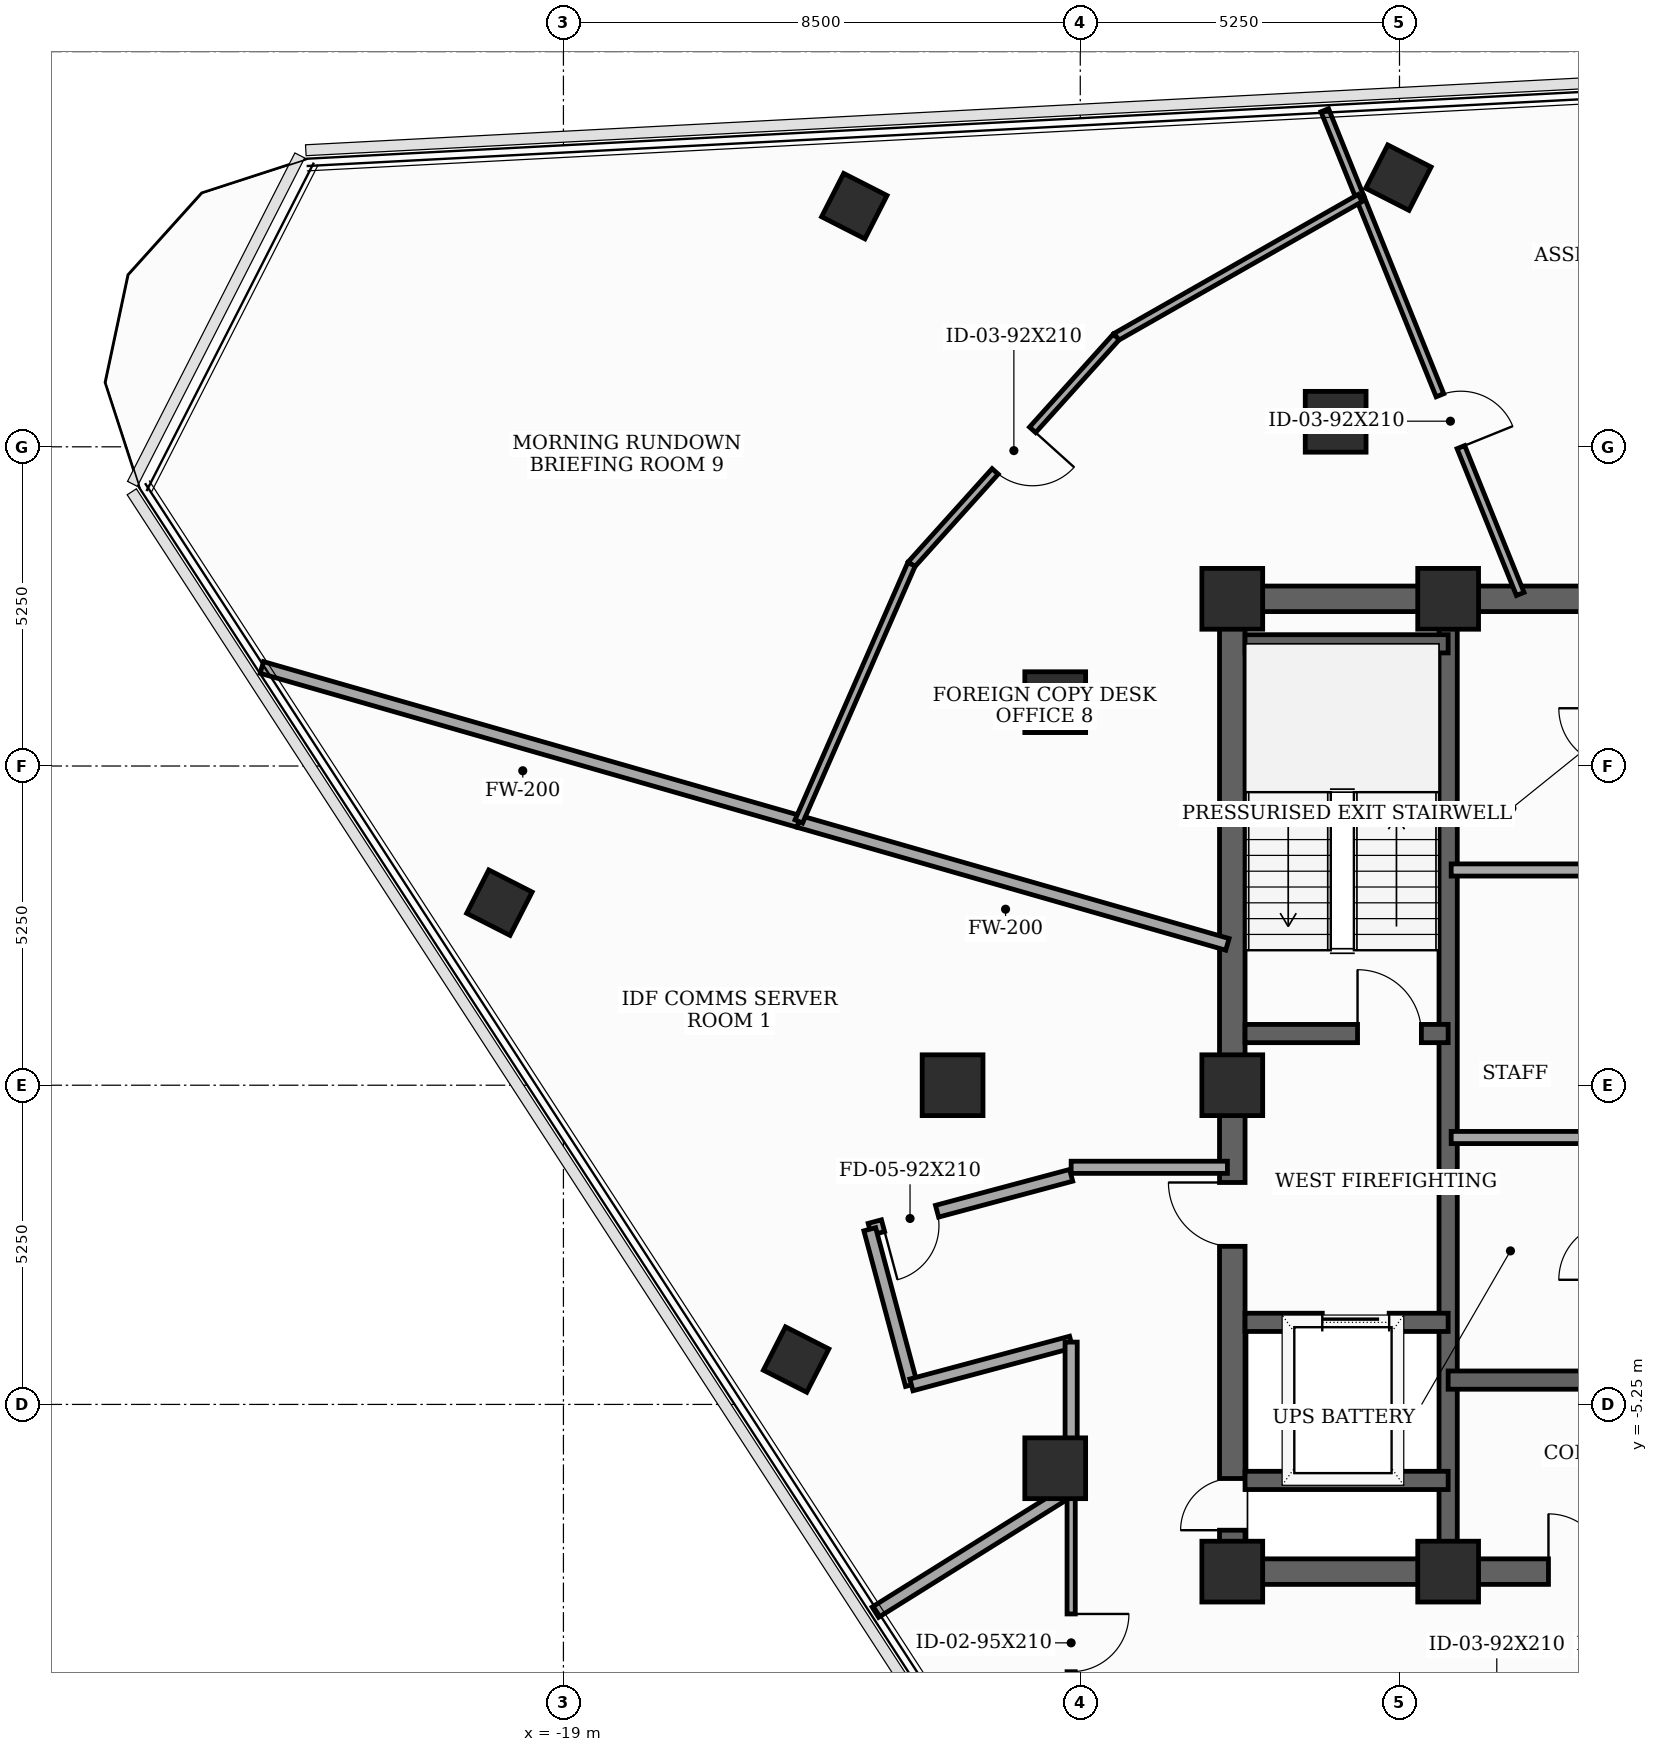
"""IFC4 building model, lengths in metres.
Left out: names, types, materials, properties, quantities, classifications, styles, units other than length and angle.
Written with IfcOpenShell. Run it as: python <this file> out.ifc"""

import sys

from ifc_helpers import new_model, si_unit, direction, frame, frame_2d, origin, origin_2d, place, context, subcontext, project, spatial, rectangle, extrude, element, fill, save


model = new_model("IFC4")
c1 = context("Model", 3, precision=1e-05, world=origin(), true_north=direction((0.0, 1.0)))
c2 = subcontext(c1, "Body", "Model", "MODEL_VIEW")
j1 = project(units=[si_unit("LENGTHUNIT", "METRE"), si_unit("PLANEANGLEUNIT", "RADIAN")], contexts=[c1])
p1 = place(None, origin())
s1 = spatial("IfcSite", under=j1, at=p1, CompositionType="ELEMENT")
p2 = place(p1, origin())
s2 = spatial("IfcBuilding", under=s1, at=p2, CompositionType="ELEMENT")
p3 = place(p2, frame((0.0, 0.0, 259.6)))
s3 = spatial("IfcBuildingStorey", under=s2, at=p3, CompositionType="ELEMENT", Elevation=259.6)
for number, where, z_axis, x_axis in (
    (1, (-8.0, -8.0, 0.0), (0.0, 0.0, 1.0), (1.0, 0.0, 0.0)),
    (2, (-4.45, -8.0, 0.0), (0.0, 0.0, 1.0), (1.0, 0.0, 0.0)),
    (3, (-4.45, 8.0, 0.0), (0.0, 0.0, 1.0), (1.0, 0.0, 0.0)),
    (4, (-8.0, 8.0, 0.0), (0.0, 0.0, 1.0), (1.0, 0.0, 0.0)),
    (5, (-8.0, 0.0, 0.0), (0.0, 0.0, 1.0), (1.0, 0.0, 0.0)),
    (6, (-6.3, 10.912, 0.0), (0.0, 0.0, 1.0), (1.0, 0.0, 0.0)),
    (7, (-10.912, 6.3, 0.0), (0.0, 0.0, 1.0), (1.0, 0.0, 0.0)),
    (8, (-12.6, 0.0, 0.0), (0.0, 0.0, 1.0), (1.0, 0.0, 0.0)),
    (9, (-10.912, -6.3, 0.0), (0.0, 0.0, 1.0), (1.0, 0.0, 0.0)),
):
    element("IfcColumn", number, at=place(p3, frame(where, z_axis=z_axis, x_axis=x_axis)), inside=s3, PredefinedType="COLUMN", context=c2, shape_type="SweptSolid", body=[
        extrude(rectangle(XDim=1.0, YDim=1.0, at=origin_2d()), origin(), (0.0, 0.0, 1.0), 3.7),
    ])
for number, where, z_axis, x_axis in (
    (10, (-5.269, 14.927, 0.0), (0.0, 0.0, 1.0), (0.454, 0.891, 0.0)),
    (11, (-14.216, 14.458, 0.0), (0.0, 0.0, 1.0), (0.454, 0.891, 0.0)),
    (12, (-20.053, 3.003, 0.0), (0.0, 0.0, 1.0), (0.454, 0.891, 0.0)),
    (13, (-15.173, -4.512, 0.0), (0.0, 0.0, 1.0), (0.454, 0.891, 0.0)),
):
    element("IfcColumn", number, at=place(p3, frame(where, z_axis=z_axis, x_axis=x_axis)), inside=s3, PredefinedType="COLUMN", context=c2, shape_type="SweptSolid", body=[
        extrude(rectangle(XDim=0.8, YDim=0.8, at=origin_2d()), origin(), (0.0, 0.0, 1.0), 3.7),
    ])
p4 = place(p3, frame((-8.0, -8.0, 0.0), z_axis=(0.0, 0.0, 1.0), x_axis=(0.0, 1.0, 0.0)))
e14 = element("IfcWall", 14, at=p4, inside=s3, PredefinedType="SHEAR", context=c2, shape_type="SweptSolid", body=[
    extrude(rectangle(XDim=16.0, YDim=0.42, at=frame_2d((8.0, 0.0))), origin(), (0.0, 0.0, 1.0), 3.5),
])
p5 = place(p4, frame((0.681, 0.0, 0.0)))
e15 = element("IfcOpeningElement", 15, at=p5, cuts=e14, PredefinedType="OPENING", context=c2, shape_type="SweptSolid", body=[
    extrude(rectangle(XDim=0.85, YDim=2.02, at=frame_2d((0.425, 1.01))), frame((0.0, 0.22, 0.0), z_axis=(0.0, -1.0, 0.0), x_axis=(1.0, 0.0, 0.0)), (0.0, 0.0, 1.0), 0.44),
])
p6 = place(p4, frame((5.35, 0.0, 0.0)))
e16 = element("IfcOpeningElement", 16, at=p6, cuts=e14, PredefinedType="OPENING", context=c2, shape_type="SweptSolid", body=[
    extrude(rectangle(XDim=1.05, YDim=2.15, at=frame_2d((0.525, 1.075))), frame((0.0, 0.22, 0.0), z_axis=(0.0, -1.0, 0.0), x_axis=(1.0, 0.0, 0.0)), (0.0, 0.0, 1.0), 0.44),
])
p7 = place(p3, frame((-8.0, -8.0, 0.0), z_axis=(0.0, 0.0, 1.0), x_axis=(1.0, 0.0, 0.0)))
e17 = element("IfcWall", 17, at=p7, inside=s3, PredefinedType="SHEAR", context=c2, shape_type="SweptSolid", body=[
    extrude(rectangle(XDim=16.0, YDim=0.42, at=frame_2d((8.0, 0.0))), origin(), (0.0, 0.0, 1.0), 3.5),
])
p8 = place(p7, frame((5.2, 0.0, 0.0)))
e18 = element("IfcOpeningElement", 18, at=p8, cuts=e17, PredefinedType="OPENING", context=c2, shape_type="SweptSolid", body=[
    extrude(rectangle(XDim=0.95, YDim=2.1, at=frame_2d((0.475, 1.05))), frame((0.0, 0.22, 0.0), z_axis=(0.0, -1.0, 0.0), x_axis=(1.0, 0.0, 0.0)), (0.0, 0.0, 1.0), 0.44),
])
p9 = place(p7, frame((9.8, 0.0, 0.0)))
e19 = element("IfcOpeningElement", 19, at=p9, cuts=e17, PredefinedType="OPENING", context=c2, shape_type="SweptSolid", body=[
    extrude(rectangle(XDim=0.95, YDim=2.1, at=frame_2d((0.475, 1.05))), frame((0.0, 0.22, 0.0), z_axis=(0.0, -1.0, 0.0), x_axis=(1.0, 0.0, 0.0)), (0.0, 0.0, 1.0), 0.44),
])
p10 = place(p3, frame((-8.0, 8.0, 0.0), z_axis=(0.0, 0.0, 1.0), x_axis=(1.0, 0.0, 0.0)))
e20 = element("IfcWall", 20, at=p10, inside=s3, PredefinedType="SHEAR", context=c2, shape_type="SweptSolid", body=[
    extrude(rectangle(XDim=16.0, YDim=0.42, at=frame_2d((8.0, 0.0))), origin(), (0.0, 0.0, 1.0), 3.5),
])
p11 = place(p10, frame((7.1, 0.0, 0.0)))
e21 = element("IfcOpeningElement", 21, at=p11, cuts=e20, PredefinedType="OPENING", context=c2, shape_type="SweptSolid", body=[
    extrude(rectangle(XDim=1.8, YDim=2.15, at=frame_2d((0.9, 1.075))), frame((0.0, 0.22, 0.0), z_axis=(0.0, -1.0, 0.0), x_axis=(1.0, 0.0, 0.0)), (0.0, 0.0, 1.0), 0.44),
])
p12 = place(p3, frame((-4.45, -7.79, 0.0), z_axis=(0.0, 0.0, 1.0), x_axis=(0.0, 1.0, 0.0)))
e22 = element("IfcWall", 22, at=p12, inside=s3, PredefinedType="SHEAR", context=c2, shape_type="SweptSolid", body=[
    extrude(rectangle(XDim=15.58, YDim=0.3, at=frame_2d((7.79, 0.0))), origin(), (0.0, 0.0, 1.0), 3.5),
])
p13 = place(p3, frame((-7.79, 0.85, 0.0), z_axis=(0.0, 0.0, 1.0), x_axis=(1.0, 0.0, 0.0)))
e23 = element("IfcWall", 23, at=p13, inside=s3, PredefinedType="SHEAR", context=c2, shape_type="SweptSolid", body=[
    extrude(rectangle(XDim=3.34, YDim=0.3, at=frame_2d((1.67, 0.0))), origin(), (0.0, 0.0, 1.0), 3.5),
])
p14 = place(p13, frame((1.85, 0.0, 0.0)))
e24 = element("IfcOpeningElement", 24, at=p14, cuts=e23, PredefinedType="OPENING", context=c2, shape_type="SweptSolid", body=[
    extrude(rectangle(XDim=1.05, YDim=2.15, at=frame_2d((0.525, 1.075))), frame((0.0, 0.16, 0.0), z_axis=(0.0, -1.0, 0.0), x_axis=(1.0, 0.0, 0.0)), (0.0, 0.0, 1.0), 0.32),
])
p15 = place(p3, frame((-7.79, 7.26, 0.0), z_axis=(0.0, 0.0, 1.0), x_axis=(1.0, 0.0, 0.0)))
e25 = element("IfcWall", 25, at=p15, inside=s3, PredefinedType="SHEAR", context=c2, shape_type="SweptSolid", body=[
    extrude(rectangle(XDim=3.34, YDim=0.3, at=frame_2d((1.67, 0.0))), origin(), (0.0, 0.0, 1.0), 3.5),
])
p16 = place(p3, frame((-7.79, -3.9, 0.0), z_axis=(0.0, 0.0, 1.0), x_axis=(1.0, 0.0, 0.0)))
e26 = element("IfcWall", 26, at=p16, inside=s3, PredefinedType="SHEAR", context=c2, shape_type="SweptSolid", body=[
    extrude(rectangle(XDim=3.34, YDim=0.3, at=frame_2d((1.67, 0.0))), origin(), (0.0, 0.0, 1.0), 3.5),
])
p17 = place(p16, frame((1.27, 0.0, 0.0)))
e27 = element("IfcOpeningElement", 27, at=p17, cuts=e26, PredefinedType="OPENING", context=c2, shape_type="SweptSolid", body=[
    extrude(rectangle(XDim=1.1, YDim=2.1, at=frame_2d((0.55, 1.05))), frame((0.0, 0.16, 0.0), z_axis=(0.0, -1.0, 0.0), x_axis=(1.0, 0.0, 0.0)), (0.0, 0.0, 1.0), 0.32),
])
p18 = place(p3, frame((-7.79, -6.5, 0.0), z_axis=(0.0, 0.0, 1.0), x_axis=(1.0, 0.0, 0.0)))
e28 = element("IfcWall", 28, at=p18, inside=s3, PredefinedType="SHEAR", context=c2, shape_type="SweptSolid", body=[
    extrude(rectangle(XDim=3.34, YDim=0.3, at=frame_2d((1.67, 0.0))), origin(), (0.0, 0.0, 1.0), 3.5),
])
p19 = place(p3, frame((-4.45, -4.85, 0.0), z_axis=(0.0, 0.0, 1.0), x_axis=(1.0, 0.0, 0.0)))
e29 = element("IfcWall", 29, at=p19, inside=s3, PredefinedType="SHEAR", context=c2, shape_type="SweptSolid", body=[
    extrude(rectangle(XDim=8.9, YDim=0.3, at=frame_2d((4.45, 0.0))), origin(), (0.0, 0.0, 1.0), 3.5),
])
for number, where, z_axis, x_axis in (
    (30, (-4.4, -0.86, 0.0), (0.0, 0.0, 1.0), (1.0, 0.0, 0.0)),
    (31, (-4.4, 3.54, 0.0), (0.0, 0.0, 1.0), (1.0, 0.0, 0.0)),
):
    element("IfcWall", number, at=place(p3, frame(where, z_axis=z_axis, x_axis=x_axis)), inside=s3, PredefinedType="SOLIDWALL", context=c2, shape_type="SweptSolid", body=[
        extrude(rectangle(XDim=2.68, YDim=0.2, at=frame_2d((1.34, 0.0))), origin(), (0.0, 0.0, 1.0), 3.5),
    ])
p20 = place(p3, frame((-8.08, -1.35, 0.0), z_axis=(0.0, 0.0, 1.0), x_axis=(-1.0, 0.0, 0.0)))
e32 = element("IfcWall", 32, at=p20, inside=s3, PredefinedType="SOLIDWALL", context=c2, shape_type="SweptSolid", body=[
    extrude(rectangle(XDim=2.57, YDim=0.2, at=frame_2d((1.285, 0.0))), origin(), (0.0, 0.0, 1.0), 2.885),
])
p21 = place(p3, frame((-10.65, -1.482, 0.0), z_axis=(0.0, 0.0, 1.0), x_axis=(-0.965961397105, -0.2586862565, 0.0)))
e33 = element("IfcWall", 33, at=p21, inside=s3, PredefinedType="SOLIDWALL", context=c2, shape_type="SweptSolid", body=[
    extrude(rectangle(XDim=3.429, YDim=0.2, at=frame_2d((1.714, 0.0))), origin(), (0.0, 0.0, 1.0), 2.885),
])
p22 = place(p21, frame((2.283, 0.0, 0.0)))
e34 = element("IfcOpeningElement", 34, at=p22, cuts=e33, PredefinedType="OPENING", context=c2, shape_type="SweptSolid", body=[
    extrude(rectangle(XDim=0.92, YDim=2.1, at=frame_2d((0.46, 1.05))), frame((0.0, 0.11, 0.0), z_axis=(0.0, -1.0, 0.0), x_axis=(1.0, 0.0, 0.0)), (0.0, 0.0, 1.0), 0.22),
])
p23 = place(p3, frame((-13.962, -2.369, 0.0), z_axis=(0.0, 0.0, 1.0), x_axis=(0.258413725385, -0.966034340245, 0.0)))
e35 = element("IfcWall", 35, at=p23, inside=s3, PredefinedType="SOLIDWALL", context=c2, shape_type="SweptSolid", body=[
    extrude(rectangle(XDim=2.65, YDim=0.2, at=frame_2d((1.325, 0.0))), origin(), (0.0, 0.0, 1.0), 3.5),
])
p24 = place(p3, frame((-13.277, -4.929, 0.0), z_axis=(0.0, 0.0, 1.0), x_axis=(0.965934830229, 0.258785439601, 0.0)))
e36 = element("IfcWall", 36, at=p24, inside=s3, PredefinedType="SOLIDWALL", context=c2, shape_type="SweptSolid", body=[
    extrude(rectangle(XDim=2.72, YDim=0.2, at=frame_2d((1.36, 0.0))), origin(), (0.0, 0.0, 1.0), 2.885),
])
p25 = place(p3, frame((-10.65, -4.225, 0.0), z_axis=(0.0, 0.0, 1.0), x_axis=(0.0, -1.0, 0.0)))
e37 = element("IfcWall", 37, at=p25, inside=s3, PredefinedType="SOLIDWALL", context=c2, shape_type="SweptSolid", body=[
    extrude(rectangle(XDim=2.43, YDim=0.2, at=frame_2d((1.215, 0.0))), origin(), (0.0, 0.0, 1.0), 2.885),
])
p26 = place(p3, frame((-10.65, -6.655, 0.0), z_axis=(0.0, 0.0, 1.0), x_axis=(0.0, -1.0, 0.0)))
e38 = element("IfcWall", 38, at=p26, inside=s3, PredefinedType="PARTITIONING", context=c2, shape_type="SweptSolid", body=[
    extrude(rectangle(XDim=3.495, YDim=0.135, at=frame_2d((1.748, 0.0))), origin(), (0.0, 0.0, 1.0), 2.885),
])
p27 = place(p26, frame((2.042, 0.0, 0.0)))
e39 = element("IfcOpeningElement", 39, at=p27, cuts=e38, PredefinedType="OPENING", context=c2, shape_type="SweptSolid", body=[
    extrude(rectangle(XDim=0.95, YDim=2.1, at=frame_2d((0.475, 1.05))), frame((0.0, 0.077, 0.0), z_axis=(0.0, -1.0, 0.0), x_axis=(1.0, 0.0, 0.0)), (0.0, 0.0, 1.0), 0.155),
])
p28 = place(p3, frame((-13.87, -8.667, 0.0), z_axis=(0.0, 0.0, 1.0), x_axis=(0.848059708933, 0.529900679454, 0.0)))
e40 = element("IfcWall", 40, at=p28, inside=s3, PredefinedType="SOLIDWALL", context=c2, shape_type="SweptSolid", body=[
    extrude(rectangle(XDim=3.797, YDim=0.2, at=frame_2d((1.898, 0.0))), origin(), (0.0, 0.0, 1.0), 2.885),
])
p29 = place(p3, frame((-8.08, 2.317, 0.0), z_axis=(0.0, 0.0, 1.0), x_axis=(-0.961260926499, 0.275640039155, 0.0)))
e41 = element("IfcWall", 41, at=p29, inside=s3, PredefinedType="SOLIDWALL", context=c2, shape_type="SweptSolid", body=[
    extrude(rectangle(XDim=7.333, YDim=0.2, at=frame_2d((3.667, 0.0))), origin(), (0.0, 0.0, 1.0), 2.885),
])
p30 = place(p3, frame((-15.129, 4.338, 0.0), z_axis=(0.0, 0.0, 1.0), x_axis=(-0.96123865256, 0.275717704953, 0.0)))
e42 = element("IfcWall", 42, at=p30, inside=s3, PredefinedType="SOLIDWALL", context=c2, shape_type="SweptSolid", body=[
    extrude(rectangle(XDim=9.188, YDim=0.2, at=frame_2d((4.594, 0.0))), origin(), (0.0, 0.0, 1.0), 3.035),
])
p31 = place(p3, frame((-5.896, 14.593, 0.0), z_axis=(0.0, 0.0, 1.0), x_axis=(0.374630268076, -0.927174289032, 0.0)))
e43 = element("IfcWall", 43, at=p31, inside=s3, PredefinedType="PARTITIONING", context=c2, shape_type="SweptSolid", body=[
    extrude(rectangle(XDim=7.024, YDim=0.135, at=frame_2d((3.512, 0.0))), origin(), (0.0, 0.0, 1.0), 2.885),
])
p32 = place(p31, frame((3.5, 0.0, 0.0)))
e44 = element("IfcOpeningElement", 44, at=p32, cuts=e43, PredefinedType="OPENING", context=c2, shape_type="SweptSolid", body=[
    extrude(rectangle(XDim=0.92, YDim=2.1, at=frame_2d((0.46, 1.05))), frame((0.0, 0.077, 0.0), z_axis=(0.0, -1.0, 0.0), x_axis=(1.0, 0.0, 0.0)), (0.0, 0.0, 1.0), 0.155),
])
p33 = place(p3, frame((-6.479, 16.035, 0.0), z_axis=(0.0, 0.0, 1.0), x_axis=(0.374743256905, -0.927128627217, 0.0)))
e45 = element("IfcWall", 45, at=p33, inside=s3, PredefinedType="PARTITIONING", context=c2, shape_type="SweptSolid", body=[
    extrude(rectangle(XDim=1.556, YDim=0.135, at=frame_2d((0.778, 0.0))), origin(), (0.0, 0.0, 1.0), 3.035),
])
p34 = place(p3, frame((-5.896, 14.593, 0.0), z_axis=(0.0, 0.0, 1.0), x_axis=(-0.868954887981, -0.494891303877, 0.0)))
e46 = element("IfcWall", 46, at=p34, inside=s3, PredefinedType="PARTITIONING", context=c2, shape_type="SweptSolid", body=[
    extrude(rectangle(XDim=4.617, YDim=0.135, at=frame_2d((2.309, 0.0))), origin(), (0.0, 0.0, 1.0), 3.035),
])
p35 = place(p3, frame((-9.908, 12.308, 0.0), z_axis=(0.0, 0.0, 1.0), x_axis=(-0.669055831343, -0.743212146393, 0.0)))
e47 = element("IfcWall", 47, at=p35, inside=s3, PredefinedType="PARTITIONING", context=c2, shape_type="SweptSolid", body=[
    extrude(rectangle(XDim=5.034, YDim=0.135, at=frame_2d((2.517, 0.0))), origin(), (0.0, 0.0, 1.0), 3.035),
])
p36 = place(p35, frame((2.057, 0.0, 0.0)))
e48 = element("IfcOpeningElement", 48, at=p36, cuts=e47, PredefinedType="OPENING", context=c2, shape_type="SweptSolid", body=[
    extrude(rectangle(XDim=0.92, YDim=2.1, at=frame_2d((0.46, 1.05))), frame((0.0, 0.077, 0.0), z_axis=(0.0, -1.0, 0.0), x_axis=(1.0, 0.0, 0.0)), (0.0, 0.0, 1.0), 0.155),
])
p37 = place(p3, frame((-13.276, 8.567, 0.0), z_axis=(0.0, 0.0, 1.0), x_axis=(-0.401334709075, -0.915931466482, 0.0)))
e49 = element("IfcWall", 49, at=p37, inside=s3, PredefinedType="PARTITIONING", context=c2, shape_type="SweptSolid", body=[
    extrude(rectangle(XDim=4.617, YDim=0.135, at=frame_2d((2.309, 0.0))), origin(), (0.0, 0.0, 1.0), 3.185),
])
p38 = place(p5, origin())
e50 = element("IfcDoor", 50, at=p38, inside=s3, OperationType="SINGLE_SWING_LEFT", PredefinedType="TRAPDOOR", context=c2, shape_type="SweptSolid", body=[
    extrude(rectangle(XDim=0.85, YDim=2.02, at=frame_2d((0.425, 1.01))), frame((0.0, 0.025, 0.0), z_axis=(0.0, -1.0, 0.0), x_axis=(1.0, 0.0, 0.0)), (0.0, 0.0, 1.0), 0.05),
])
fill(e15, e50)
p39 = place(p6, origin())
e51 = element("IfcDoor", 51, at=p39, inside=s3, OperationType="SINGLE_SWING_RIGHT", PredefinedType="DOOR", context=c2, shape_type="SweptSolid", body=[
    extrude(rectangle(XDim=1.05, YDim=2.15, at=frame_2d((0.525, 1.075))), frame((0.0, 0.025, 0.0), z_axis=(0.0, -1.0, 0.0), x_axis=(1.0, 0.0, 0.0)), (0.0, 0.0, 1.0), 0.05),
])
fill(e16, e51)
p40 = place(p8, origin())
e52 = element("IfcDoor", 52, at=p40, inside=s3, OperationType="SINGLE_SWING_LEFT", PredefinedType="DOOR", context=c2, shape_type="SweptSolid", body=[
    extrude(rectangle(XDim=0.95, YDim=2.1, at=frame_2d((0.475, 1.05))), frame((0.0, 0.025, 0.0), z_axis=(0.0, -1.0, 0.0), x_axis=(1.0, 0.0, 0.0)), (0.0, 0.0, 1.0), 0.05),
])
fill(e18, e52)
p41 = place(p14, origin())
e53 = element("IfcDoor", 53, at=p41, inside=s3, OperationType="SINGLE_SWING_LEFT", PredefinedType="DOOR", context=c2, shape_type="SweptSolid", body=[
    extrude(rectangle(XDim=1.05, YDim=2.15, at=frame_2d((0.525, 1.075))), frame((0.0, 0.025, 0.0), z_axis=(0.0, -1.0, 0.0), x_axis=(1.0, 0.0, 0.0)), (0.0, 0.0, 1.0), 0.05),
])
fill(e24, e53)
p42 = place(p17, origin())
e54 = element("IfcDoor", 54, at=p42, inside=s3, OperationType="SLIDING_TO_LEFT", PredefinedType="DOOR", context=c2, shape_type="SweptSolid", body=[
    extrude(rectangle(XDim=1.1, YDim=2.1, at=frame_2d((0.55, 1.05))), frame((0.0, 0.025, 0.0), z_axis=(0.0, -1.0, 0.0), x_axis=(1.0, 0.0, 0.0)), (0.0, 0.0, 1.0), 0.05),
])
fill(e27, e54)
p43 = place(p22, origin())
e55 = element("IfcDoor", 55, at=p43, inside=s3, OperationType="SINGLE_SWING_RIGHT", PredefinedType="DOOR", context=c2, shape_type="SweptSolid", body=[
    extrude(rectangle(XDim=0.92, YDim=2.1, at=frame_2d((0.46, 1.05))), frame((0.0, 0.025, 0.0), z_axis=(0.0, -1.0, 0.0), x_axis=(1.0, 0.0, 0.0)), (0.0, 0.0, 1.0), 0.05),
])
fill(e34, e55)
p44 = place(p27, origin())
e56 = element("IfcDoor", 56, at=p44, inside=s3, OperationType="SINGLE_SWING_LEFT", PredefinedType="DOOR", context=c2, shape_type="SweptSolid", body=[
    extrude(rectangle(XDim=0.95, YDim=2.1, at=frame_2d((0.475, 1.05))), frame((0.0, 0.025, 0.0), z_axis=(0.0, -1.0, 0.0), x_axis=(1.0, 0.0, 0.0)), (0.0, 0.0, 1.0), 0.05),
])
fill(e39, e56)
p45 = place(p32, origin())
e57 = element("IfcDoor", 57, at=p45, inside=s3, OperationType="SINGLE_SWING_RIGHT", PredefinedType="DOOR", context=c2, shape_type="SweptSolid", body=[
    extrude(rectangle(XDim=0.92, YDim=2.1, at=frame_2d((0.46, 1.05))), frame((0.0, 0.025, 0.0), z_axis=(0.0, -1.0, 0.0), x_axis=(1.0, 0.0, 0.0)), (0.0, 0.0, 1.0), 0.05),
])
fill(e44, e57)
p46 = place(p36, origin())
e58 = element("IfcDoor", 58, at=p46, inside=s3, OperationType="SINGLE_SWING_LEFT", PredefinedType="DOOR", context=c2, shape_type="SweptSolid", body=[
    extrude(rectangle(XDim=0.92, YDim=2.1, at=frame_2d((0.46, 1.05))), frame((0.0, 0.025, 0.0), z_axis=(0.0, -1.0, 0.0), x_axis=(1.0, 0.0, 0.0)), (0.0, 0.0, 1.0), 0.05),
])
fill(e48, e58)
save(model, sys.argv[1])
